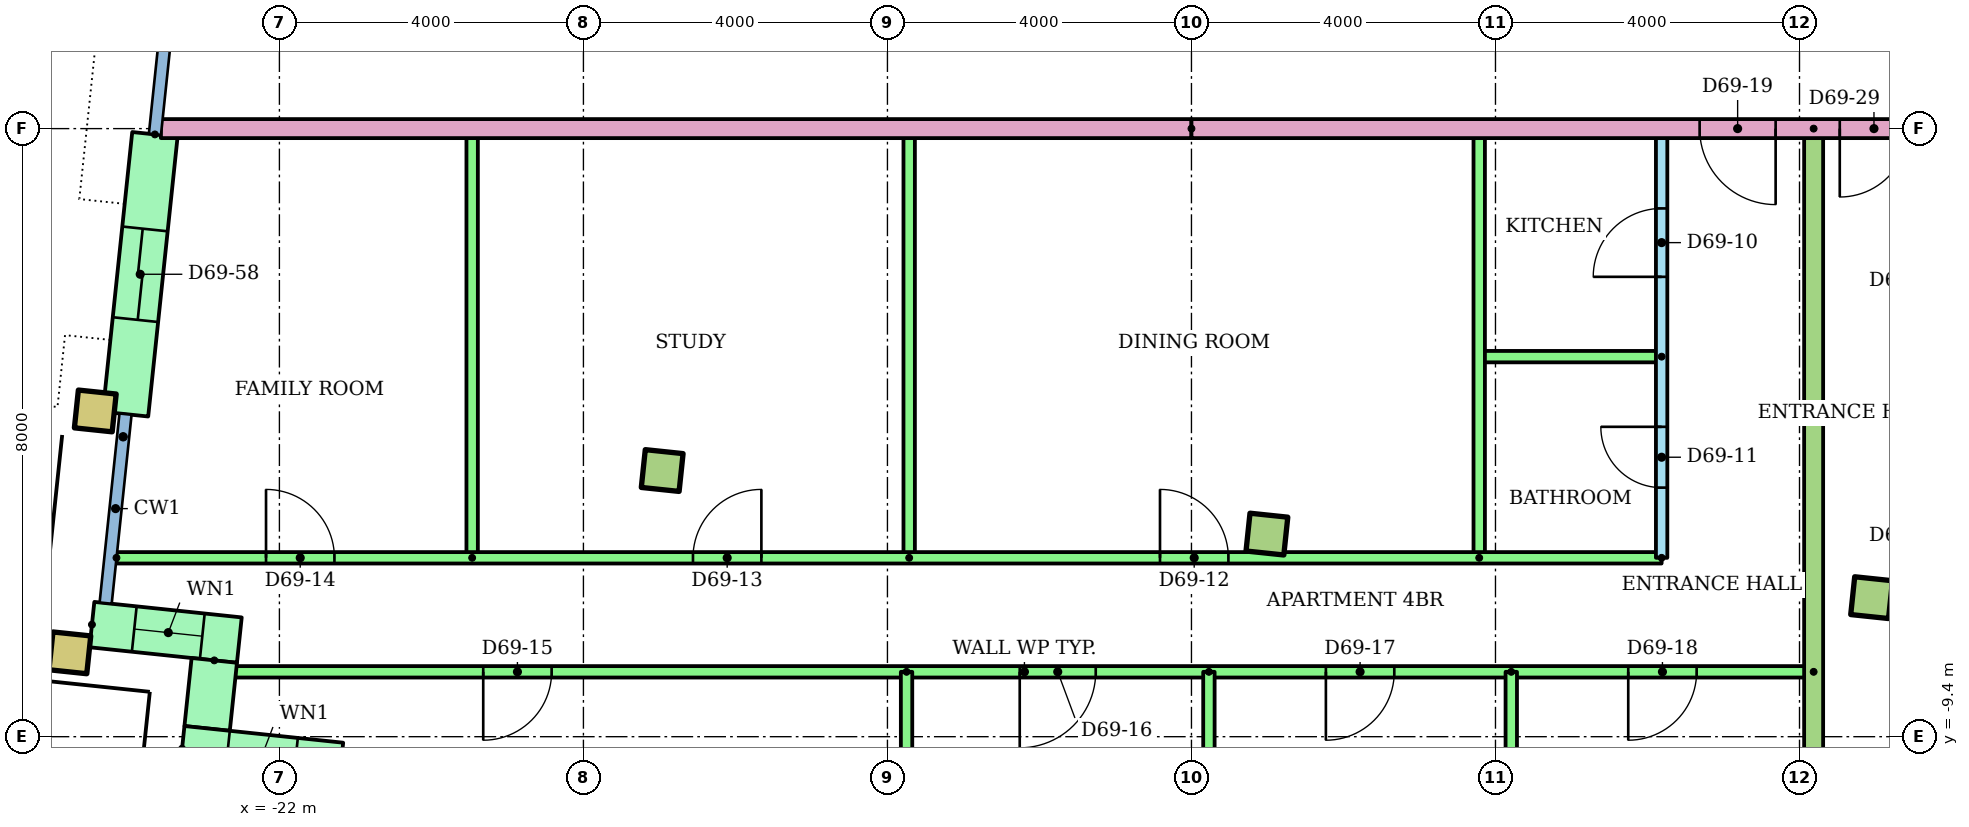
"""IFC4 building model, lengths in metres.
Left out: names, types, materials, properties, quantities, classifications, styles, units other than length and angle.
Written with IfcOpenShell. Run it as: python <this file> out.ifc"""

import sys

from ifc_helpers import new_model, si_unit, direction, frame, frame_2d, origin, origin_2d, place, context, subcontext, project, spatial, rectangle, hollow_rectangle, extrude, element, fill, save


model = new_model("IFC4")
c1 = context("Model", 3, precision=1e-05, world=origin(), true_north=direction((0.0, 1.0)))
c2 = subcontext(c1, "Body", "Model", "MODEL_VIEW")
j1 = project(units=[si_unit("LENGTHUNIT", "METRE"), si_unit("PLANEANGLEUNIT", "RADIAN")], contexts=[c1])
p1 = place(None, origin())
s1 = spatial("IfcSite", under=j1, at=p1, CompositionType="ELEMENT")
p2 = place(p1, origin())
s2 = spatial("IfcBuilding", under=s1, at=p2, CompositionType="ELEMENT")
p3 = place(p2, frame((0.0, 0.0, 265.9)))
s3 = spatial("IfcBuildingStorey", under=s2, at=p3, CompositionType="ELEMENT", Elevation=265.9)
for number, where, z_axis, x_axis in (
    (1, (-24.757, -8.297, 0.0), (0.0, 0.0, 1.0), (0.995, -0.105, 0.0)),
    (2, (-24.423, -5.115, 0.0), (0.0, 0.0, 1.0), (0.995, -0.105, 0.0)),
):
    element("IfcColumn", number, at=place(p3, frame(where, z_axis=z_axis, x_axis=x_axis)), inside=s3, PredefinedType="COLUMN", context=c2, shape_type="SweptSolid", body=[
        extrude(hollow_rectangle(XDim=0.5, YDim=0.5, WallThickness=0.025, at=origin_2d()), origin(), (0.0, 0.0, 1.0), 3.2),
    ])
for number, where, z_axis, x_axis in (
    (3, (-16.964, -5.898, 0.0), (0.0, 0.0, 1.0), (0.995, -0.105, 0.0)),
    (4, (-9.007, -6.735, 0.0), (0.0, 0.0, 1.0), (0.995, -0.105, 0.0)),
    (5, (-1.051, -7.571, 0.0), (0.0, 0.0, 1.0), (0.995, -0.105, 0.0)),
):
    element("IfcColumn", number, at=place(p3, frame(where, z_axis=z_axis, x_axis=x_axis)), inside=s3, PredefinedType="COLUMN", context=c2, shape_type="SweptSolid", body=[
        extrude(rectangle(XDim=0.5, YDim=0.5, at=origin_2d()), origin(), (0.0, 0.0, 1.0), 3.2),
    ])
p4 = place(p3, frame((-23.638, -1.476, 0.0), z_axis=(0.0, 0.0, 1.0), x_axis=(-0.104513052986, -0.994523514933, 0.0)))
e6 = element("IfcWall", 6, at=p4, inside=s3, PredefinedType="STANDARD", context=c2, shape_type="SweptSolid", body=[
    extrude(rectangle(XDim=3.7, YDim=0.6, at=frame_2d((1.85, 0.0))), origin(), (0.0, 0.0, 1.0), 2.92),
])
p5 = place(p4, frame((1.25, 0.0, 0.0)))
e7 = element("IfcOpeningElement", 7, at=p5, cuts=e6, PredefinedType="OPENING", context=c2, shape_type="SweptSolid", body=[
    extrude(rectangle(XDim=1.2, YDim=2.1, at=frame_2d((0.6, 1.05))), frame((0.0, 0.31, 0.0), z_axis=(0.0, -1.0, 0.0), x_axis=(1.0, 0.0, 0.0)), (0.0, 0.0, 1.0), 0.62),
])
p6 = place(p3, frame((-24.467, -7.925, 0.0), z_axis=(0.0, 0.0, 1.0), x_axis=(0.994521219184, -0.104534896528, 0.0)))
e8 = element("IfcWall", 8, at=p6, inside=s3, PredefinedType="STANDARD", context=c2, shape_type="SweptSolid", body=[
    extrude(rectangle(XDim=1.95, YDim=0.6, at=frame_2d((0.975, 0.0))), origin(), (0.0, 0.0, 1.0), 2.92),
])
p7 = place(p6, frame((0.56, 0.0, 0.9)))
e9 = element("IfcOpeningElement", 9, at=p7, cuts=e8, PredefinedType="OPENING", context=c2, shape_type="SweptSolid", body=[
    extrude(rectangle(XDim=0.9, YDim=1.5, at=frame_2d((0.45, 0.75))), frame((0.0, 0.31, 0.0), z_axis=(0.0, -1.0, 0.0), x_axis=(1.0, 0.0, 0.0)), (0.0, 0.0, 1.0), 0.62),
])
p8 = place(p3, frame((-22.857, -8.396, 0.0), z_axis=(0.0, 0.0, 1.0), x_axis=(-0.104444712852, -0.994530694326, 0.0)))
e10 = element("IfcWall", 10, at=p8, inside=s3, PredefinedType="STANDARD", context=c2, shape_type="SweptSolid", body=[
    extrude(rectangle(XDim=0.9, YDim=0.6, at=frame_2d((0.45, 0.0))), origin(), (0.0, 0.0, 1.0), 2.92),
])
p9 = place(p3, frame((-23.281, -9.558, 0.0), z_axis=(0.0, 0.0, 1.0), x_axis=(0.994523910136, -0.104509292252, 0.0)))
e11 = element("IfcWall", 11, at=p9, inside=s3, PredefinedType="STANDARD", context=c2, shape_type="SweptSolid", body=[
    extrude(rectangle(XDim=2.1, YDim=0.6, at=frame_2d((1.05, 0.0))), origin(), (0.0, 0.0, 1.0), 2.92),
])
p10 = place(p9, frame((0.6, 0.0, 0.9)))
e12 = element("IfcOpeningElement", 12, at=p10, cuts=e11, PredefinedType="OPENING", context=c2, shape_type="SweptSolid", body=[
    extrude(rectangle(XDim=0.9, YDim=1.5, at=frame_2d((0.45, 0.75))), frame((0.0, 0.31, 0.0), z_axis=(0.0, -1.0, 0.0), x_axis=(1.0, 0.0, 0.0)), (0.0, 0.0, 1.0), 0.62),
])
p11 = place(p3, frame((-3.814, -7.047, 0.0), z_axis=(0.0, 0.0, 1.0), x_axis=(0.0, 1.0, 0.0)))
e13 = element("IfcWall", 13, at=p11, inside=s3, PredefinedType="PARTITIONING", context=c2, shape_type="SweptSolid", body=[
    extrude(rectangle(XDim=5.647, YDim=0.15, at=frame_2d((2.823, 0.0))), origin(), (0.0, 0.0, 1.0), 2.4),
])
p12 = place(p11, frame((3.697, 0.0, 0.0)))
e14 = element("IfcOpeningElement", 14, at=p12, cuts=e13, PredefinedType="OPENING", context=c2, shape_type="SweptSolid", body=[
    extrude(rectangle(XDim=0.9, YDim=2.1, at=frame_2d((0.45, 1.05))), frame((0.0, 0.085, 0.0), z_axis=(0.0, -1.0, 0.0), x_axis=(1.0, 0.0, 0.0)), (0.0, 0.0, 1.0), 0.17),
])
p13 = place(p11, frame((0.923, 0.0, 0.0)))
e15 = element("IfcOpeningElement", 15, at=p13, cuts=e13, PredefinedType="OPENING", context=c2, shape_type="SweptSolid", body=[
    extrude(rectangle(XDim=0.8, YDim=2.1, at=frame_2d((0.4, 1.05))), frame((0.0, 0.085, 0.0), z_axis=(0.0, -1.0, 0.0), x_axis=(1.0, 0.0, 0.0)), (0.0, 0.0, 1.0), 0.17),
])
p14 = place(p3, frame((-3.814, -4.4, 0.0), z_axis=(0.0, 0.0, 1.0), x_axis=(-1.0, 0.0, 0.0)))
e16 = element("IfcWall", 16, at=p14, inside=s3, PredefinedType="PARTITIONING", context=c2, shape_type="SweptSolid", body=[
    extrude(rectangle(XDim=2.4, YDim=0.15, at=frame_2d((1.2, 0.0))), origin(), (0.0, 0.0, 1.0), 2.4),
])
for number, where, z_axis, x_axis in (
    (17, (-6.214, -7.047, 0.0), (0.0, 0.0, 1.0), (0.0, 1.0, 0.0)),
    (18, (-13.714, -7.047, 0.0), (0.0, 0.0, 1.0), (0.0, 1.0, 0.0)),
    (19, (-19.464, -7.047, 0.0), (0.0, 0.0, 1.0), (0.0, 1.0, 0.0)),
):
    element("IfcWall", number, at=place(p3, frame(where, z_axis=z_axis, x_axis=x_axis)), inside=s3, PredefinedType="PARTITIONING", context=c2, shape_type="SweptSolid", body=[
        extrude(rectangle(XDim=5.647, YDim=0.15, at=frame_2d((2.823, 0.0))), origin(), (0.0, 0.0, 1.0), 2.4),
    ])
p15 = place(p3, frame((-24.144, -7.047, 0.0)))
e20 = element("IfcWall", 20, at=p15, inside=s3, PredefinedType="PARTITIONING", context=c2, shape_type="SweptSolid", body=[
    extrude(rectangle(XDim=20.33, YDim=0.15, at=frame_2d((10.165, 0.0))), origin(), (0.0, 0.0, 1.0), 2.4),
])
p16 = place(p15, frame((13.73, 0.0, 0.0)))
e21 = element("IfcOpeningElement", 21, at=p16, cuts=e20, PredefinedType="OPENING", context=c2, shape_type="SweptSolid", body=[
    extrude(rectangle(XDim=0.9, YDim=2.1, at=frame_2d((0.45, 1.05))), frame((0.0, 0.085, 0.0), z_axis=(0.0, -1.0, 0.0), x_axis=(1.0, 0.0, 0.0)), (0.0, 0.0, 1.0), 0.17),
])
p17 = place(p15, frame((7.585, 0.0, 0.0)))
e22 = element("IfcOpeningElement", 22, at=p17, cuts=e20, PredefinedType="OPENING", context=c2, shape_type="SweptSolid", body=[
    extrude(rectangle(XDim=0.9, YDim=2.1, at=frame_2d((0.45, 1.05))), frame((0.0, 0.085, 0.0), z_axis=(0.0, -1.0, 0.0), x_axis=(1.0, 0.0, 0.0)), (0.0, 0.0, 1.0), 0.17),
])
p18 = place(p15, frame((1.968, 0.0, 0.0)))
e23 = element("IfcOpeningElement", 23, at=p18, cuts=e20, PredefinedType="OPENING", context=c2, shape_type="SweptSolid", body=[
    extrude(rectangle(XDim=0.9, YDim=2.1, at=frame_2d((0.45, 1.05))), frame((0.0, 0.085, 0.0), z_axis=(0.0, -1.0, 0.0), x_axis=(1.0, 0.0, 0.0)), (0.0, 0.0, 1.0), 0.17),
])
p19 = place(p3, frame((-1.814, -8.547, 0.0), z_axis=(0.0, 0.0, 1.0), x_axis=(-1.0, 0.0, 0.0)))
e24 = element("IfcWall", 24, at=p19, inside=s3, PredefinedType="PARTITIONING", context=c2, shape_type="SweptSolid", body=[
    extrude(rectangle(XDim=20.767, YDim=0.15, at=frame_2d((10.384, 0.0))), origin(), (0.0, 0.0, 1.0), 2.4),
])
p20 = place(p19, frame((16.604, 0.0, 0.0)))
e25 = element("IfcOpeningElement", 25, at=p20, cuts=e24, PredefinedType="OPENING", context=c2, shape_type="SweptSolid", body=[
    extrude(rectangle(XDim=0.9, YDim=2.1, at=frame_2d((0.45, 1.05))), frame((0.0, 0.085, 0.0), z_axis=(0.0, -1.0, 0.0), x_axis=(1.0, 0.0, 0.0)), (0.0, 0.0, 1.0), 0.17),
])
p21 = place(p19, frame((9.446, 0.0, 0.0)))
e26 = element("IfcOpeningElement", 26, at=p21, cuts=e24, PredefinedType="OPENING", context=c2, shape_type="SweptSolid", body=[
    extrude(rectangle(XDim=1.0, YDim=2.1, at=frame_2d((0.5, 1.05))), frame((0.0, 0.085, 0.0), z_axis=(0.0, -1.0, 0.0), x_axis=(1.0, 0.0, 0.0)), (0.0, 0.0, 1.0), 0.17),
])
p22 = place(p19, frame((5.517, 0.0, 0.0)))
e27 = element("IfcOpeningElement", 27, at=p22, cuts=e24, PredefinedType="OPENING", context=c2, shape_type="SweptSolid", body=[
    extrude(rectangle(XDim=0.9, YDim=2.1, at=frame_2d((0.45, 1.05))), frame((0.0, 0.085, 0.0), z_axis=(0.0, -1.0, 0.0), x_axis=(1.0, 0.0, 0.0)), (0.0, 0.0, 1.0), 0.17),
])
p23 = place(p19, frame((1.539, 0.0, 0.0)))
e28 = element("IfcOpeningElement", 28, at=p23, cuts=e24, PredefinedType="OPENING", context=c2, shape_type="SweptSolid", body=[
    extrude(rectangle(XDim=0.9, YDim=2.1, at=frame_2d((0.45, 1.05))), frame((0.0, 0.085, 0.0), z_axis=(0.0, -1.0, 0.0), x_axis=(1.0, 0.0, 0.0)), (0.0, 0.0, 1.0), 0.17),
])
p24 = place(p3, frame((-13.749, -8.547, 0.0), z_axis=(0.0, 0.0, 1.0), x_axis=(0.0, -1.0, 0.0)))
e29 = element("IfcWall", 29, at=p24, inside=s3, PredefinedType="PARTITIONING", context=c2, shape_type="SweptSolid", body=[
    extrude(rectangle(XDim=4.95, YDim=0.15, at=frame_2d((2.475, 0.0))), origin(), (0.0, 0.0, 1.0), 2.4),
])
p25 = place(p3, frame((-9.771, -8.547, 0.0), z_axis=(0.0, 0.0, 1.0), x_axis=(0.0, -1.0, 0.0)))
e30 = element("IfcWall", 30, at=p25, inside=s3, PredefinedType="PARTITIONING", context=c2, shape_type="SweptSolid", body=[
    extrude(rectangle(XDim=5.358, YDim=0.15, at=frame_2d((2.679, 0.0))), origin(), (0.0, 0.0, 1.0), 2.4),
])
p26 = place(p3, frame((-5.792, -8.547, 0.0), z_axis=(0.0, 0.0, 1.0), x_axis=(0.0, -1.0, 0.0)))
e31 = element("IfcWall", 31, at=p26, inside=s3, PredefinedType="PARTITIONING", context=c2, shape_type="SweptSolid", body=[
    extrude(rectangle(XDim=5.787, YDim=0.15, at=frame_2d((2.893, 0.0))), origin(), (0.0, 0.0, 1.0), 2.4),
])
p27 = place(p3, frame((-1.814, -1.4, 0.0), z_axis=(0.0, 0.0, 1.0), x_axis=(0.0, -1.0, 0.0)))
e32 = element("IfcWall", 32, at=p27, inside=s3, PredefinedType="PARTITIONING", context=c2, shape_type="SweptSolid", body=[
    extrude(rectangle(XDim=13.341, YDim=0.25, at=frame_2d((6.67, 0.0))), origin(), (0.0, 0.0, 1.0), 2.4),
])
p28 = place(p3, frame((-10.0, -1.4, 0.0), z_axis=(0.0, 0.0, 1.0), x_axis=(-1.0, 0.0, 0.0)))
e33 = element("IfcWall", 33, at=p28, inside=s3, PredefinedType="PARTITIONING", context=c2, shape_type="SweptSolid", body=[
    extrude(rectangle(XDim=13.56, YDim=0.25, at=frame_2d((6.78, 0.0))), origin(), (0.0, 0.0, 1.0), 2.4),
])
p29 = place(p3, frame((10.0, -1.4, 0.0), z_axis=(0.0, 0.0, 1.0), x_axis=(-1.0, 0.0, 0.0)))
e34 = element("IfcWall", 34, at=p29, inside=s3, PredefinedType="PARTITIONING", context=c2, shape_type="SweptSolid", body=[
    extrude(rectangle(XDim=20.0, YDim=0.25, at=frame_2d((10.0, 0.0))), origin(), (0.0, 0.0, 1.0), 2.4),
])
p30 = place(p29, frame((12.314, 0.0, 0.0)))
e35 = element("IfcOpeningElement", 35, at=p30, cuts=e34, PredefinedType="OPENING", context=c2, shape_type="SweptSolid", body=[
    extrude(rectangle(XDim=1.0, YDim=2.1, at=frame_2d((0.5, 1.05))), frame((0.0, 0.135, 0.0), z_axis=(0.0, -1.0, 0.0), x_axis=(1.0, 0.0, 0.0)), (0.0, 0.0, 1.0), 0.27),
])
p31 = place(p29, frame((10.57, 0.0, 0.0)))
e36 = element("IfcOpeningElement", 36, at=p31, cuts=e34, PredefinedType="OPENING", context=c2, shape_type="SweptSolid", body=[
    extrude(rectangle(XDim=0.9, YDim=2.1, at=frame_2d((0.45, 1.05))), frame((0.0, 0.135, 0.0), z_axis=(0.0, -1.0, 0.0), x_axis=(1.0, 0.0, 0.0)), (0.0, 0.0, 1.0), 0.27),
])
p32 = place(p7, origin())
e37 = element("IfcWindow", 37, at=p32, inside=s3, PartitioningType="SINGLE_PANEL", PredefinedType="WINDOW", context=c2, shape_type="SweptSolid", body=[
    extrude(rectangle(XDim=0.9, YDim=1.5, at=frame_2d((0.45, 0.75))), frame((0.0, 0.03, 0.0), z_axis=(0.0, -1.0, 0.0), x_axis=(1.0, 0.0, 0.0)), (0.0, 0.0, 1.0), 0.06),
])
fill(e9, e37)
p33 = place(p12, origin())
e38 = element("IfcDoor", 38, at=p33, inside=s3, OperationType="SINGLE_SWING_LEFT", PredefinedType="DOOR", context=c2, shape_type="SweptSolid", body=[
    extrude(rectangle(XDim=0.9, YDim=2.1, at=frame_2d((0.45, 1.05))), frame((0.0, 0.025, 0.0), z_axis=(0.0, -1.0, 0.0), x_axis=(1.0, 0.0, 0.0)), (0.0, 0.0, 1.0), 0.05),
])
fill(e14, e38)
p34 = place(p13, origin())
e39 = element("IfcDoor", 39, at=p34, inside=s3, OperationType="SINGLE_SWING_RIGHT", PredefinedType="DOOR", context=c2, shape_type="SweptSolid", body=[
    extrude(rectangle(XDim=0.8, YDim=2.1, at=frame_2d((0.4, 1.05))), frame((0.0, 0.025, 0.0), z_axis=(0.0, -1.0, 0.0), x_axis=(1.0, 0.0, 0.0)), (0.0, 0.0, 1.0), 0.05),
])
fill(e15, e39)
p35 = place(p16, origin())
e40 = element("IfcDoor", 40, at=p35, inside=s3, OperationType="SINGLE_SWING_LEFT", PredefinedType="DOOR", context=c2, shape_type="SweptSolid", body=[
    extrude(rectangle(XDim=0.9, YDim=2.1, at=frame_2d((0.45, 1.05))), frame((0.0, 0.025, 0.0), z_axis=(0.0, -1.0, 0.0), x_axis=(1.0, 0.0, 0.0)), (0.0, 0.0, 1.0), 0.05),
])
fill(e21, e40)
p36 = place(p17, origin())
e41 = element("IfcDoor", 41, at=p36, inside=s3, OperationType="SINGLE_SWING_RIGHT", PredefinedType="DOOR", context=c2, shape_type="SweptSolid", body=[
    extrude(rectangle(XDim=0.9, YDim=2.1, at=frame_2d((0.45, 1.05))), frame((0.0, 0.025, 0.0), z_axis=(0.0, -1.0, 0.0), x_axis=(1.0, 0.0, 0.0)), (0.0, 0.0, 1.0), 0.05),
])
fill(e22, e41)
p37 = place(p18, origin())
e42 = element("IfcDoor", 42, at=p37, inside=s3, OperationType="SINGLE_SWING_LEFT", PredefinedType="DOOR", context=c2, shape_type="SweptSolid", body=[
    extrude(rectangle(XDim=0.9, YDim=2.1, at=frame_2d((0.45, 1.05))), frame((0.0, 0.025, 0.0), z_axis=(0.0, -1.0, 0.0), x_axis=(1.0, 0.0, 0.0)), (0.0, 0.0, 1.0), 0.05),
])
fill(e23, e42)
p38 = place(p20, origin())
e43 = element("IfcDoor", 43, at=p38, inside=s3, OperationType="SINGLE_SWING_RIGHT", PredefinedType="DOOR", context=c2, shape_type="SweptSolid", body=[
    extrude(rectangle(XDim=0.9, YDim=2.1, at=frame_2d((0.45, 1.05))), frame((0.0, 0.025, 0.0), z_axis=(0.0, -1.0, 0.0), x_axis=(1.0, 0.0, 0.0)), (0.0, 0.0, 1.0), 0.05),
])
fill(e25, e43)
p39 = place(p21, origin())
e44 = element("IfcDoor", 44, at=p39, inside=s3, OperationType="SINGLE_SWING_RIGHT", PredefinedType="DOOR", context=c2, shape_type="SweptSolid", body=[
    extrude(rectangle(XDim=1.0, YDim=2.1, at=frame_2d((0.5, 1.05))), frame((0.0, 0.025, 0.0), z_axis=(0.0, -1.0, 0.0), x_axis=(1.0, 0.0, 0.0)), (0.0, 0.0, 1.0), 0.05),
])
fill(e26, e44)
p40 = place(p22, origin())
e45 = element("IfcDoor", 45, at=p40, inside=s3, OperationType="SINGLE_SWING_RIGHT", PredefinedType="DOOR", context=c2, shape_type="SweptSolid", body=[
    extrude(rectangle(XDim=0.9, YDim=2.1, at=frame_2d((0.45, 1.05))), frame((0.0, 0.025, 0.0), z_axis=(0.0, -1.0, 0.0), x_axis=(1.0, 0.0, 0.0)), (0.0, 0.0, 1.0), 0.05),
])
fill(e27, e45)
p41 = place(p23, origin())
e46 = element("IfcDoor", 46, at=p41, inside=s3, OperationType="SINGLE_SWING_RIGHT", PredefinedType="DOOR", context=c2, shape_type="SweptSolid", body=[
    extrude(rectangle(XDim=0.9, YDim=2.1, at=frame_2d((0.45, 1.05))), frame((0.0, 0.025, 0.0), z_axis=(0.0, -1.0, 0.0), x_axis=(1.0, 0.0, 0.0)), (0.0, 0.0, 1.0), 0.05),
])
fill(e28, e46)
p42 = place(p30, origin())
e47 = element("IfcDoor", 47, at=p42, inside=s3, OperationType="SINGLE_SWING_LEFT", PredefinedType="DOOR", context=c2, shape_type="SweptSolid", body=[
    extrude(rectangle(XDim=1.0, YDim=2.1, at=frame_2d((0.5, 1.05))), frame((0.0, 0.025, 0.0), z_axis=(0.0, -1.0, 0.0), x_axis=(1.0, 0.0, 0.0)), (0.0, 0.0, 1.0), 0.05),
])
fill(e35, e47)
p43 = place(p31, origin())
e48 = element("IfcDoor", 48, at=p43, inside=s3, OperationType="SINGLE_SWING_RIGHT", PredefinedType="DOOR", context=c2, shape_type="SweptSolid", body=[
    extrude(rectangle(XDim=0.9, YDim=2.1, at=frame_2d((0.45, 1.05))), frame((0.0, 0.025, 0.0), z_axis=(0.0, -1.0, 0.0), x_axis=(1.0, 0.0, 0.0)), (0.0, 0.0, 1.0), 0.05),
])
fill(e36, e48)
p44 = place(p5, origin())
e49 = element("IfcDoor", 49, at=p44, inside=s3, OperationType="SLIDING_TO_LEFT", PredefinedType="DOOR", context=c2, shape_type="SweptSolid", body=[
    extrude(rectangle(XDim=1.2, YDim=2.1, at=frame_2d((0.6, 1.05))), frame((0.0, 0.025, 0.0), z_axis=(0.0, -1.0, 0.0), x_axis=(1.0, 0.0, 0.0)), (0.0, 0.0, 1.0), 0.05),
])
fill(e7, e49)
save(model, sys.argv[1])
